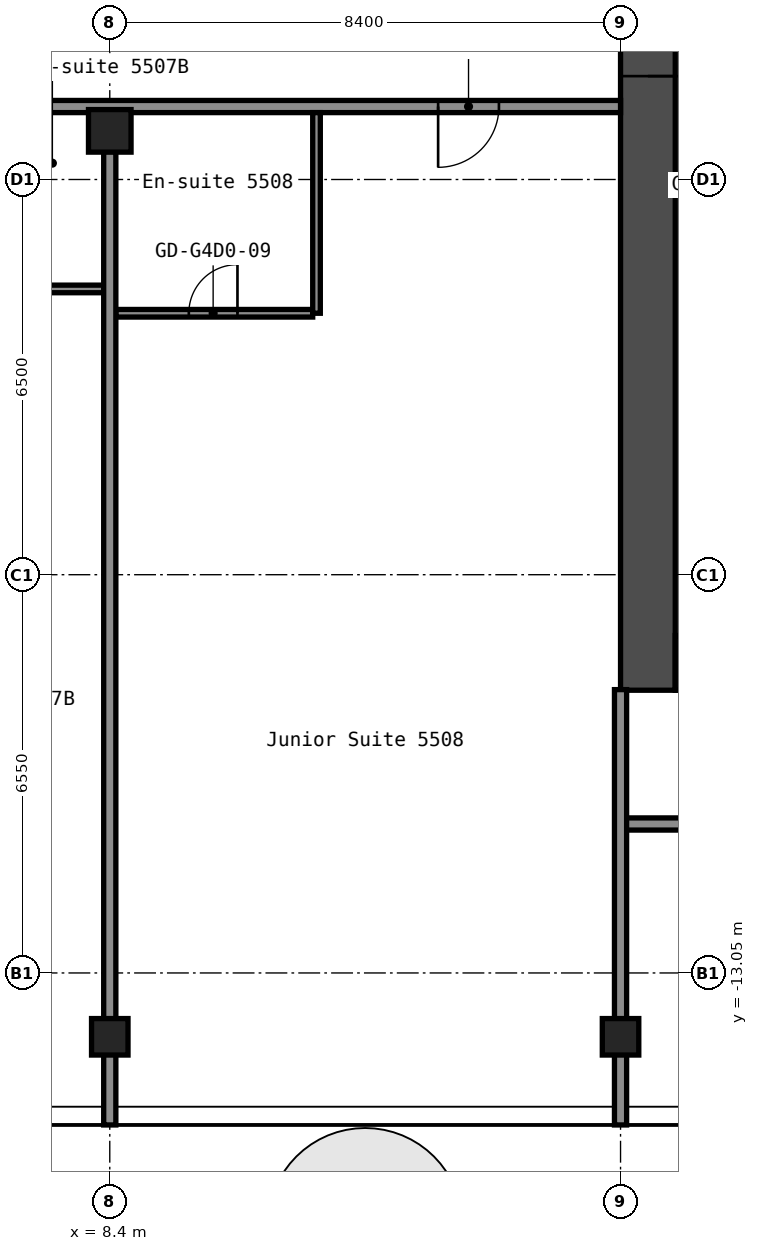
"""IFC4 building model, lengths in metres.
Left out: names, types, materials, properties, quantities, classifications, styles, units other than length and angle.
Written with IfcOpenShell. Run it as: python <this file> out.ifc"""

import sys

from ifc_helpers import new_model, si_unit, direction, frame, frame_2d, origin, origin_2d, place, context, subcontext, project, spatial, rectangle, hollow_rectangle, extrude, element, fill, save


model = new_model("IFC4")
c1 = context("Model", 3, precision=1e-05, world=origin(), true_north=direction((0.0, 1.0)))
c2 = subcontext(c1, "Body", "Model", "MODEL_VIEW")
j1 = project(units=[si_unit("LENGTHUNIT", "METRE"), si_unit("PLANEANGLEUNIT", "RADIAN")], contexts=[c1])
p1 = place(None, origin())
s1 = spatial("IfcSite", under=j1, at=p1, CompositionType="ELEMENT")
p2 = place(p1, origin())
s2 = spatial("IfcBuilding", under=s1, at=p2, CompositionType="ELEMENT")
p3 = place(p2, frame((0.0, 0.0, 196.2)))
s3 = spatial("IfcBuildingStorey", under=s2, at=p3, CompositionType="ELEMENT", Elevation=196.2)
p4 = place(p3, frame((8.4, -14.1, 0.0), z_axis=(0.0, 0.0, 1.0), x_axis=(1.0, 0.0, 0.0)))
e1 = element("IfcColumn", 1, at=p4, inside=s3, PredefinedType="COLUMN", context=c2, shape_type="SweptSolid", body=[
    extrude(hollow_rectangle(XDim=0.6, YDim=0.6, WallThickness=0.025, InnerFilletRadius=0.038, OuterFilletRadius=0.062, at=origin_2d()), origin(), (0.0, 0.0, 1.0), 2.75),
])
p5 = place(p3, frame((8.4, 0.8, 0.0), z_axis=(0.0, 0.0, 1.0), x_axis=(1.0, 0.0, 0.0)))
e2 = element("IfcColumn", 2, at=p5, inside=s3, PredefinedType="COLUMN", context=c2, shape_type="SweptSolid", body=[
    extrude(hollow_rectangle(XDim=0.7, YDim=0.7, WallThickness=0.028, at=origin_2d()), origin(), (0.0, 0.0, 1.0), 2.75),
])
p6 = place(p3, frame((16.8, -14.1, 0.0), z_axis=(0.0, 0.0, 1.0), x_axis=(1.0, 0.0, 0.0)))
e3 = element("IfcColumn", 3, at=p6, inside=s3, PredefinedType="COLUMN", context=c2, shape_type="SweptSolid", body=[
    extrude(hollow_rectangle(XDim=0.6, YDim=0.6, WallThickness=0.025, InnerFilletRadius=0.038, OuterFilletRadius=0.062, at=origin_2d()), origin(), (0.0, 0.0, 1.0), 2.75),
])
p7 = place(p3, frame((17.25, -8.4, 0.0), z_axis=(0.0, 0.0, 1.0), x_axis=(0.0, 1.0, 0.0)))
e4 = element("IfcWall", 4, at=p7, inside=s3, PredefinedType="SHEAR", context=c2, shape_type="SweptSolid", body=[
    extrude(rectangle(XDim=16.8, YDim=0.9, at=frame_2d((8.4, 0.0))), origin(), (0.0, 0.0, 1.0), 2.75),
])
p8 = place(p7, frame((10.1, 0.0, 0.0)))
e5 = element("IfcOpeningElement", 5, at=p8, cuts=e4, PredefinedType="OPENING", context=c2, shape_type="SweptSolid", body=[
    extrude(rectangle(XDim=1.6, YDim=2.1, at=frame_2d((0.8, 1.05))), frame((0.0, 0.46, 0.0), z_axis=(0.0, -1.0, 0.0), x_axis=(1.0, 0.0, 0.0)), (0.0, 0.0, 1.0), 0.92),
])
p9 = place(p3, frame((17.7, -7.95, 0.0), z_axis=(0.0, 0.0, 1.0), x_axis=(1.0, 0.0, 0.0)))
e6 = element("IfcWall", 6, at=p9, inside=s3, PredefinedType="SHEAR", context=c2, shape_type="SweptSolid", body=[
    extrude(rectangle(XDim=15.0, YDim=0.9, at=frame_2d((7.5, 0.0))), origin(), (0.0, 0.0, 1.0), 2.75),
])
p10 = place(p9, frame((2.55, 0.0, 0.0)))
e7 = element("IfcOpeningElement", 7, at=p10, cuts=e6, PredefinedType="OPENING", context=c2, shape_type="SweptSolid", body=[
    extrude(rectangle(XDim=1.0, YDim=2.1, at=frame_2d((0.5, 1.05))), frame((0.0, 0.46, 0.0), z_axis=(0.0, -1.0, 0.0), x_axis=(1.0, 0.0, 0.0)), (0.0, 0.0, 1.0), 0.92),
])
p11 = place(p3, frame((16.8, -10.6, 0.0), z_axis=(0.0, 0.0, 1.0), x_axis=(1.0, 0.0, 0.0)))
e8 = element("IfcWall", 8, at=p11, inside=s3, PredefinedType="PARTITIONING", context=c2, shape_type="SweptSolid", body=[
    extrude(rectangle(XDim=21.3, YDim=0.2, at=frame_2d((10.65, 0.0))), origin(), (0.0, 0.0, 1.0), 2.75),
])
p12 = place(p11, frame((3.7, 0.0, 0.0)))
e9 = element("IfcOpeningElement", 9, at=p12, cuts=e8, PredefinedType="OPENING", context=c2, shape_type="SweptSolid", body=[
    extrude(rectangle(XDim=1.0, YDim=2.1, at=frame_2d((0.5, 1.05))), frame((0.0, 0.11, 0.0), z_axis=(0.0, -1.0, 0.0), x_axis=(1.0, 0.0, 0.0)), (0.0, 0.0, 1.0), 0.22),
])
p13 = place(p11, frame((12.1, 0.0, 0.0)))
e10 = element("IfcOpeningElement", 10, at=p13, cuts=e8, PredefinedType="OPENING", context=c2, shape_type="SweptSolid", body=[
    extrude(rectangle(XDim=1.0, YDim=2.1, at=frame_2d((0.5, 1.05))), frame((0.0, 0.11, 0.0), z_axis=(0.0, -1.0, 0.0), x_axis=(1.0, 0.0, 0.0)), (0.0, 0.0, 1.0), 0.22),
])
p14 = place(p11, frame((18.45, 0.0, 0.0)))
e11 = element("IfcOpeningElement", 11, at=p14, cuts=e8, PredefinedType="OPENING", context=c2, shape_type="SweptSolid", body=[
    extrude(rectangle(XDim=0.9, YDim=2.1, at=frame_2d((0.45, 1.05))), frame((0.0, 0.11, 0.0), z_axis=(0.0, -1.0, 0.0), x_axis=(1.0, 0.0, 0.0)), (0.0, 0.0, 1.0), 0.22),
])
p15 = place(p3, frame((8.5, -2.2, 0.0), z_axis=(0.0, 0.0, 1.0), x_axis=(1.0, 0.0, 0.0)))
e12 = element("IfcWall", 12, at=p15, inside=s3, PredefinedType="PARTITIONING", context=c2, shape_type="SweptSolid", body=[
    extrude(rectangle(XDim=3.238, YDim=0.125, at=frame_2d((1.619, 0.0))), origin(), (0.0, 0.0, 1.0), 2.75),
])
p16 = place(p15, frame((1.2, 0.0, 0.0)))
e13 = element("IfcOpeningElement", 13, at=p16, cuts=e12, PredefinedType="OPENING", context=c2, shape_type="SweptSolid", body=[
    extrude(rectangle(XDim=0.8, YDim=2.1, at=frame_2d((0.4, 1.05))), frame((0.0, 0.073, 0.0), z_axis=(0.0, -1.0, 0.0), x_axis=(1.0, 0.0, 0.0)), (0.0, 0.0, 1.0), 0.145),
])
p17 = place(p3, frame((5.962, -1.8, 0.0), z_axis=(0.0, 0.0, 1.0), x_axis=(1.0, 0.0, 0.0)))
e14 = element("IfcWall", 14, at=p17, inside=s3, PredefinedType="PARTITIONING", context=c2, shape_type="SweptSolid", body=[
    extrude(rectangle(XDim=2.338, YDim=0.125, at=frame_2d((1.169, 0.0))), origin(), (0.0, 0.0, 1.0), 2.75),
])
p18 = place(p3, frame((-16.8, 1.2, 0.0), z_axis=(0.0, 0.0, 1.0), x_axis=(1.0, 0.0, 0.0)))
e15 = element("IfcWall", 15, at=p18, inside=s3, PredefinedType="PARTITIONING", context=c2, shape_type="SweptSolid", body=[
    extrude(rectangle(XDim=33.6, YDim=0.2, at=frame_2d((16.8, 0.0))), origin(), (0.0, 0.0, 1.0), 2.75),
])
p19 = place(p18, frame((2.85, 0.0, 0.0)))
e16 = element("IfcOpeningElement", 16, at=p19, cuts=e15, PredefinedType="OPENING", context=c2, shape_type="SweptSolid", body=[
    extrude(rectangle(XDim=1.0, YDim=2.1, at=frame_2d((0.5, 1.05))), frame((0.0, 0.11, 0.0), z_axis=(0.0, -1.0, 0.0), x_axis=(1.0, 0.0, 0.0)), (0.0, 0.0, 1.0), 0.22),
])
p20 = place(p18, frame((4.55, 0.0, 0.0)))
e17 = element("IfcOpeningElement", 17, at=p20, cuts=e15, PredefinedType="OPENING", context=c2, shape_type="SweptSolid", body=[
    extrude(rectangle(XDim=1.0, YDim=2.1, at=frame_2d((0.5, 1.05))), frame((0.0, 0.11, 0.0), z_axis=(0.0, -1.0, 0.0), x_axis=(1.0, 0.0, 0.0)), (0.0, 0.0, 1.0), 0.22),
])
p21 = place(p18, frame((12.1, 0.0, 0.0)))
e18 = element("IfcOpeningElement", 18, at=p21, cuts=e15, PredefinedType="OPENING", context=c2, shape_type="SweptSolid", body=[
    extrude(rectangle(XDim=1.0, YDim=2.1, at=frame_2d((0.5, 1.05))), frame((0.0, 0.11, 0.0), z_axis=(0.0, -1.0, 0.0), x_axis=(1.0, 0.0, 0.0)), (0.0, 0.0, 1.0), 0.22),
])
p22 = place(p18, frame((19.65, 0.0, 0.0)))
e19 = element("IfcOpeningElement", 19, at=p22, cuts=e15, PredefinedType="OPENING", context=c2, shape_type="SweptSolid", body=[
    extrude(rectangle(XDim=1.0, YDim=2.1, at=frame_2d((0.5, 1.05))), frame((0.0, 0.11, 0.0), z_axis=(0.0, -1.0, 0.0), x_axis=(1.0, 0.0, 0.0)), (0.0, 0.0, 1.0), 0.22),
])
p23 = place(p18, frame((21.35, 0.0, 0.0)))
e20 = element("IfcOpeningElement", 20, at=p23, cuts=e15, PredefinedType="OPENING", context=c2, shape_type="SweptSolid", body=[
    extrude(rectangle(XDim=1.0, YDim=2.1, at=frame_2d((0.5, 1.05))), frame((0.0, 0.11, 0.0), z_axis=(0.0, -1.0, 0.0), x_axis=(1.0, 0.0, 0.0)), (0.0, 0.0, 1.0), 0.22),
])
p24 = place(p18, frame((30.6, 0.0, 0.0)))
e21 = element("IfcOpeningElement", 21, at=p24, cuts=e15, PredefinedType="OPENING", context=c2, shape_type="SweptSolid", body=[
    extrude(rectangle(XDim=1.0, YDim=2.1, at=frame_2d((0.5, 1.05))), frame((0.0, 0.11, 0.0), z_axis=(0.0, -1.0, 0.0), x_axis=(1.0, 0.0, 0.0)), (0.0, 0.0, 1.0), 0.22),
])
p25 = place(p3, frame((8.4, -15.55, 0.0), z_axis=(0.0, 0.0, 1.0), x_axis=(0.0, 1.0, 0.0)))
e22 = element("IfcWall", 22, at=p25, inside=s3, PredefinedType="PARTITIONING", context=c2, shape_type="SweptSolid", body=[
    extrude(rectangle(XDim=16.01, YDim=0.2, at=frame_2d((8.005, 0.0))), origin(), (0.0, 0.0, 1.0), 2.75),
])
p26 = place(p3, frame((11.8, -2.2, 0.0), z_axis=(0.0, 0.0, 1.0), x_axis=(0.0, 1.0, 0.0)))
e23 = element("IfcWall", 23, at=p26, inside=s3, PredefinedType="PARTITIONING", context=c2, shape_type="SweptSolid", body=[
    extrude(rectangle(XDim=3.3, YDim=0.125, at=frame_2d((1.65, 0.0))), origin(), (0.0, 0.0, 1.0), 2.75),
])
p27 = place(p3, frame((16.8, -15.55, 0.0), z_axis=(0.0, 0.0, 1.0), x_axis=(0.0, 1.0, 0.0)))
e24 = element("IfcWall", 24, at=p27, inside=s3, PredefinedType="PARTITIONING", context=c2, shape_type="SweptSolid", body=[
    extrude(rectangle(XDim=7.16, YDim=0.2, at=frame_2d((3.58, 0.0))), origin(), (0.0, 0.0, 1.0), 2.75),
])
p28 = place(p8, origin())
e25 = element("IfcDoor", 25, at=p28, inside=s3, OperationType="DOUBLE_DOOR_SINGLE_SWING", PredefinedType="DOOR", context=c2, shape_type="SweptSolid", body=[
    extrude(rectangle(XDim=1.6, YDim=2.1, at=frame_2d((0.8, 1.05))), frame((0.0, 0.025, 0.0), z_axis=(0.0, -1.0, 0.0), x_axis=(1.0, 0.0, 0.0)), (0.0, 0.0, 1.0), 0.05),
])
fill(e5, e25)
p29 = place(p16, origin())
e26 = element("IfcDoor", 26, at=p29, inside=s3, OperationType="SINGLE_SWING_LEFT", PredefinedType="DOOR", context=c2, shape_type="SweptSolid", body=[
    extrude(rectangle(XDim=0.8, YDim=2.1, at=frame_2d((0.4, 1.05))), frame((0.0, 0.025, 0.0), z_axis=(0.0, -1.0, 0.0), x_axis=(1.0, 0.0, 0.0)), (0.0, 0.0, 1.0), 0.05),
])
fill(e13, e26)
p30 = place(p24, origin())
e27 = element("IfcDoor", 27, at=p30, inside=s3, OperationType="SINGLE_SWING_LEFT", PredefinedType="DOOR", context=c2, shape_type="SweptSolid", body=[
    extrude(rectangle(XDim=1.0, YDim=2.1, at=frame_2d((0.5, 1.05))), frame((0.0, 0.025, 0.0), z_axis=(0.0, -1.0, 0.0), x_axis=(1.0, 0.0, 0.0)), (0.0, 0.0, 1.0), 0.05),
])
fill(e21, e27)
save(model, sys.argv[1])
